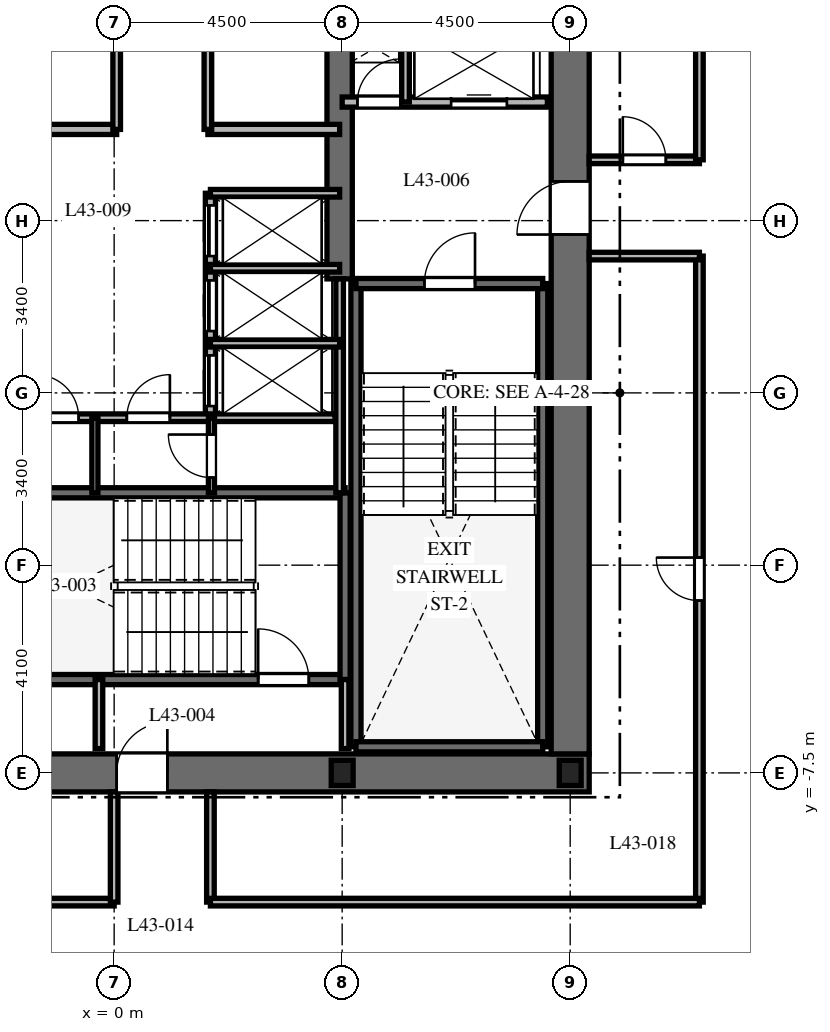
"""IFC4 building model, lengths in metres.
Left out: names, types, materials, properties, quantities, classifications, styles, units other than length and angle.
Written with IfcOpenShell. Run it as: python <this file> out.ifc"""

import sys

from ifc_helpers import new_model, si_unit, direction, frame, frame_2d, origin, origin_2d, place, context, subcontext, project, spatial, rectangle, i_section, extrude, element, fill, save


model = new_model("IFC4")
c1 = context("Model", 3, precision=1e-05, world=origin(), true_north=direction((0.0, 1.0)))
c2 = subcontext(c1, "Body", "Model", "MODEL_VIEW")
j1 = project(units=[si_unit("LENGTHUNIT", "METRE"), si_unit("PLANEANGLEUNIT", "RADIAN")], contexts=[c1])
p1 = place(None, origin())
s1 = spatial("IfcSite", under=j1, at=p1, CompositionType="ELEMENT")
p2 = place(p1, origin())
s2 = spatial("IfcBuilding", under=s1, at=p2, CompositionType="ELEMENT")
p3 = place(p2, frame((0.0, 0.0, 175.6)))
s3 = spatial("IfcBuildingStorey", under=s2, at=p3, CompositionType="ELEMENT", Elevation=175.6)
p4 = place(p3, frame((-9.375, -7.5, 0.0), z_axis=(0.0, 0.0, 1.0), x_axis=(1.0, 0.0, 0.0)))
e1 = element("IfcWall", 1, at=p4, inside=s3, PredefinedType="SHEAR", context=c2, shape_type="SweptSolid", body=[
    extrude(rectangle(XDim=18.75, YDim=0.75, at=frame_2d((9.375, 0.0))), origin(), (0.0, 0.0, 1.0), 3.7),
])
p5 = place(p4, frame((9.425, 0.0, 0.0)))
e2 = element("IfcOpeningElement", 2, at=p5, cuts=e1, PredefinedType="OPENING", context=c2, shape_type="SweptSolid", body=[
    extrude(rectangle(XDim=1.0, YDim=2.15, at=frame_2d((0.5, 1.075))), frame((0.0, 0.385, 0.0), z_axis=(0.0, -1.0, 0.0), x_axis=(1.0, 0.0, 0.0)), (0.0, 0.0, 1.0), 0.77),
])
p6 = place(p3, frame((9.0, -7.125, 0.0), z_axis=(0.0, 0.0, 1.0), x_axis=(0.0, 1.0, 0.0)))
e3 = element("IfcWall", 3, at=p6, inside=s3, PredefinedType="SHEAR", context=c2, shape_type="SweptSolid", body=[
    extrude(rectangle(XDim=14.25, YDim=0.75, at=frame_2d((7.125, 0.0))), origin(), (0.0, 0.0, 1.0), 3.7),
])
p7 = place(p6, frame((10.25, 0.0, 0.0)))
e4 = element("IfcOpeningElement", 4, at=p7, cuts=e3, PredefinedType="OPENING", context=c2, shape_type="SweptSolid", body=[
    extrude(rectangle(XDim=1.05, YDim=2.15, at=frame_2d((0.525, 1.075))), frame((0.0, 0.385, 0.0), z_axis=(0.0, -1.0, 0.0), x_axis=(1.0, 0.0, 0.0)), (0.0, 0.0, 1.0), 0.77),
])
p8 = place(p3, frame((4.45, 2.25, 0.0), z_axis=(0.0, 0.0, 1.0), x_axis=(0.0, 1.0, 0.0)))
e5 = element("IfcWall", 5, at=p8, inside=s3, PredefinedType="SHEAR", context=c2, shape_type="SweptSolid", body=[
    extrude(rectangle(XDim=4.875, YDim=0.5, at=frame_2d((2.438, 0.0))), origin(), (0.0, 0.0, 1.0), 3.7),
])
for number, where, z_axis, x_axis in (
    (6, (4.772, -6.985, 0.0), (0.0, 0.0, 1.0), (0.0, 1.0, 0.0)),
    (7, (8.458, -6.985, 0.0), (0.0, 0.0, 1.0), (0.0, 1.0, 0.0)),
):
    element("IfcWall", number, at=place(p3, frame(where, z_axis=z_axis, x_axis=x_axis)), inside=s3, PredefinedType="SHEAR", context=c2, shape_type="SweptSolid", body=[
        extrude(rectangle(XDim=9.143, YDim=0.2, at=frame_2d((4.572, 0.0))), origin(), (0.0, 0.0, 1.0), 3.7),
    ])
p9 = place(p3, frame((4.772, -6.985, 0.0), z_axis=(0.0, 0.0, 1.0), x_axis=(1.0, 0.0, 0.0)))
e8 = element("IfcWall", 8, at=p9, inside=s3, PredefinedType="SHEAR", context=c2, shape_type="SweptSolid", body=[
    extrude(rectangle(XDim=3.686, YDim=0.2, at=frame_2d((1.843, 0.0))), origin(), (0.0, 0.0, 1.0), 3.7),
])
p10 = place(p3, frame((4.772, 2.158, 0.0), z_axis=(0.0, 0.0, 1.0), x_axis=(1.0, 0.0, 0.0)))
e9 = element("IfcWall", 9, at=p10, inside=s3, PredefinedType="SHEAR", context=c2, shape_type="SweptSolid", body=[
    extrude(rectangle(XDim=3.686, YDim=0.2, at=frame_2d((1.843, 0.0))), origin(), (0.0, 0.0, 1.0), 3.7),
])
p11 = place(p10, frame((1.35, 0.0, 0.0)))
e10 = element("IfcOpeningElement", 10, at=p11, cuts=e9, PredefinedType="OPENING", context=c2, shape_type="SweptSolid", body=[
    extrude(rectangle(XDim=1.0, YDim=2.15, at=frame_2d((0.5, 1.075))), frame((0.0, 0.11, 0.0), z_axis=(0.0, -1.0, 0.0), x_axis=(1.0, 0.0, 0.0)), (0.0, 0.0, 1.0), 0.22),
])
p12 = place(p3, frame((-4.608, -5.658, 0.0), z_axis=(0.0, 0.0, 1.0), x_axis=(1.0, 0.0, 0.0)))
e11 = element("IfcWall", 11, at=p12, inside=s3, PredefinedType="SHEAR", context=c2, shape_type="SweptSolid", body=[
    extrude(rectangle(XDim=9.166, YDim=0.2, at=frame_2d((4.583, 0.0))), origin(), (0.0, 0.0, 1.0), 3.7),
])
p13 = place(p12, frame((7.45, 0.0, 0.0)))
e12 = element("IfcOpeningElement", 12, at=p13, cuts=e11, PredefinedType="OPENING", context=c2, shape_type="SweptSolid", body=[
    extrude(rectangle(XDim=1.0, YDim=2.15, at=frame_2d((0.5, 1.075))), frame((0.0, 0.11, 0.0), z_axis=(0.0, -1.0, 0.0), x_axis=(1.0, 0.0, 0.0)), (0.0, 0.0, 1.0), 0.22),
])
p14 = place(p3, frame((-4.608, -1.972, 0.0), z_axis=(0.0, 0.0, 1.0), x_axis=(1.0, 0.0, 0.0)))
e13 = element("IfcWall", 13, at=p14, inside=s3, PredefinedType="SHEAR", context=c2, shape_type="SweptSolid", body=[
    extrude(rectangle(XDim=9.166, YDim=0.2, at=frame_2d((4.583, 0.0))), origin(), (0.0, 0.0, 1.0), 3.7),
])
p15 = place(p3, frame((4.558, -5.658, 0.0), z_axis=(0.0, 0.0, 1.0), x_axis=(0.0, 1.0, 0.0)))
e14 = element("IfcWall", 14, at=p15, inside=s3, PredefinedType="SHEAR", context=c2, shape_type="SweptSolid", body=[
    extrude(rectangle(XDim=3.686, YDim=0.2, at=frame_2d((1.843, 0.0))), origin(), (0.0, 0.0, 1.0), 3.7),
])
for number, where, z_axis, x_axis in (
    (15, (4.5, -7.5, 0.0), (0.0, 0.0, 1.0), (1.0, 0.0, 0.0)),
    (16, (9.0, -7.5, 0.0), (0.0, 0.0, 1.0), (1.0, 0.0, 0.0)),
):
    element("IfcColumn", number, at=place(p3, frame(where, z_axis=z_axis, x_axis=x_axis)), inside=s3, PredefinedType="COLUMN", context=c2, shape_type="SweptSolid", body=[
        extrude(i_section(OverallWidth=0.432, OverallDepth=0.498, WebThickness=0.056, FlangeThickness=0.089, at=origin_2d()), origin(), (0.0, 0.0, 1.0), 3.7),
    ])
for number, where, z_axis, x_axis in (
    (17, (-0.3, -7.02, 0.0), (0.0, 0.0, 1.0), (0.0, 1.0, 0.0)),
    (18, (4.558, -7.02, 0.0), (0.0, 0.0, 1.0), (0.0, 1.0, 0.0)),
):
    element("IfcWall", number, at=place(p3, frame(where, z_axis=z_axis, x_axis=x_axis)), inside=s3, PredefinedType="PARTITIONING", context=c2, shape_type="SweptSolid", body=[
        extrude(rectangle(XDim=1.362, YDim=0.15, at=frame_2d((0.681, 0.0))), origin(), (0.0, 0.0, 1.0), 3.4),
    ])
p16 = place(p3, frame((4.5, 5.74, 0.0), z_axis=(0.0, 0.0, 1.0), x_axis=(1.0, 0.0, 0.0)))
e19 = element("IfcWall", 19, at=p16, inside=s3, PredefinedType="PARTITIONING", context=c2, shape_type="SweptSolid", body=[
    extrude(rectangle(XDim=4.05, YDim=0.2, at=frame_2d((2.025, 0.0))), origin(), (0.0, 0.0, 1.0), 3.4),
])
p17 = place(p16, frame((0.3, 0.0, 0.0)))
e20 = element("IfcOpeningElement", 20, at=p17, cuts=e19, PredefinedType="OPENING", context=c2, shape_type="SweptSolid", body=[
    extrude(rectangle(XDim=0.85, YDim=2.03, at=frame_2d((0.425, 1.015))), frame((0.0, 0.11, 0.0), z_axis=(0.0, -1.0, 0.0), x_axis=(1.0, 0.0, 0.0)), (0.0, 0.0, 1.0), 0.22),
])
p18 = place(p16, frame((2.15, 0.0, 0.0)))
e21 = element("IfcOpeningElement", 21, at=p18, cuts=e19, PredefinedType="OPENING", context=c2, shape_type="SweptSolid", body=[
    extrude(rectangle(XDim=1.1, YDim=2.2, at=frame_2d((0.55, 1.1))), frame((0.0, 0.11, 0.0), z_axis=(0.0, -1.0, 0.0), x_axis=(1.0, 0.0, 0.0)), (0.0, 0.0, 1.0), 0.22),
])
p19 = place(p3, frame((5.75, 5.74, 0.0), z_axis=(0.0, 0.0, 1.0), x_axis=(0.0, 1.0, 0.0)))
e22 = element("IfcWall", 22, at=p19, inside=s3, PredefinedType="PARTITIONING", context=c2, shape_type="SweptSolid", body=[
    extrude(rectangle(XDim=1.41, YDim=0.15, at=frame_2d((0.705, 0.0))), origin(), (0.0, 0.0, 1.0), 3.4),
])
p20 = place(p3, frame((-4.45, 5.2, 0.0), z_axis=(0.0, 0.0, 1.0), x_axis=(1.0, 0.0, 0.0)))
e23 = element("IfcWall", 23, at=p20, inside=s3, PredefinedType="PARTITIONING", context=c2, shape_type="SweptSolid", body=[
    extrude(rectangle(XDim=4.5, YDim=0.2, at=frame_2d((2.25, 0.0))), origin(), (0.0, 0.0, 1.0), 3.4),
])
p21 = place(p3, frame((1.85, 5.2, 0.0), z_axis=(0.0, 0.0, 1.0), x_axis=(1.0, 0.0, 0.0)))
e24 = element("IfcWall", 24, at=p21, inside=s3, PredefinedType="PARTITIONING", context=c2, shape_type="SweptSolid", body=[
    extrude(rectangle(XDim=2.6, YDim=0.2, at=frame_2d((1.3, 0.0))), origin(), (0.0, 0.0, 1.0), 3.4),
])
for number, where, z_axis, x_axis in (
    (25, (0.05, 5.2, 0.0), (0.0, 0.0, 1.0), (0.0, 1.0, 0.0)),
    (26, (1.85, 5.2, 0.0), (0.0, 0.0, 1.0), (0.0, 1.0, 0.0)),
):
    element("IfcWall", number, at=place(p3, frame(where, z_axis=z_axis, x_axis=x_axis)), inside=s3, PredefinedType="PARTITIONING", context=c2, shape_type="SweptSolid", body=[
        extrude(rectangle(XDim=1.95, YDim=0.15, at=frame_2d((0.975, 0.0))), origin(), (0.0, 0.0, 1.0), 3.4),
    ])
p22 = place(p3, frame((4.45, -1.972, 0.0), z_axis=(0.0, 0.0, 1.0), x_axis=(0.0, 1.0, 0.0)))
e27 = element("IfcWall", 27, at=p22, inside=s3, PredefinedType="PARTITIONING", context=c2, shape_type="SweptSolid", body=[
    extrude(rectangle(XDim=4.222, YDim=0.15, at=frame_2d((2.111, 0.0))), origin(), (0.0, 0.0, 1.0), 3.4),
])
p23 = place(p3, frame((1.9, -0.5, 0.0), z_axis=(0.0, 0.0, 1.0), x_axis=(0.0, 1.0, 0.0)))
e28 = element("IfcWall", 28, at=p23, inside=s3, PredefinedType="PARTITIONING", context=c2, shape_type="SweptSolid", body=[
    extrude(rectangle(XDim=4.44, YDim=0.2, at=frame_2d((2.22, 0.0))), origin(), (0.0, 0.0, 1.0), 3.4),
])
p24 = place(p23, frame((0.24, 0.0, 0.0)))
e29 = element("IfcOpeningElement", 29, at=p24, cuts=e28, PredefinedType="OPENING", context=c2, shape_type="SweptSolid", body=[
    extrude(rectangle(XDim=1.0, YDim=2.2, at=frame_2d((0.5, 1.1))), frame((0.0, 0.11, 0.0), z_axis=(0.0, -1.0, 0.0), x_axis=(1.0, 0.0, 0.0)), (0.0, 0.0, 1.0), 0.22),
])
p25 = place(p23, frame((1.72, 0.0, 0.0)))
e30 = element("IfcOpeningElement", 30, at=p25, cuts=e28, PredefinedType="OPENING", context=c2, shape_type="SweptSolid", body=[
    extrude(rectangle(XDim=1.0, YDim=2.2, at=frame_2d((0.5, 1.1))), frame((0.0, 0.11, 0.0), z_axis=(0.0, -1.0, 0.0), x_axis=(1.0, 0.0, 0.0)), (0.0, 0.0, 1.0), 0.22),
])
p26 = place(p23, frame((3.2, 0.0, 0.0)))
e31 = element("IfcOpeningElement", 31, at=p26, cuts=e28, PredefinedType="OPENING", context=c2, shape_type="SweptSolid", body=[
    extrude(rectangle(XDim=1.0, YDim=2.2, at=frame_2d((0.5, 1.1))), frame((0.0, 0.11, 0.0), z_axis=(0.0, -1.0, 0.0), x_axis=(1.0, 0.0, 0.0)), (0.0, 0.0, 1.0), 0.22),
])
for number, where, z_axis, x_axis in (
    (32, (1.9, 3.94, 0.0), (0.0, 0.0, 1.0), (1.0, 0.0, 0.0)),
    (33, (1.9, 0.98, 0.0), (0.0, 0.0, 1.0), (1.0, 0.0, 0.0)),
    (34, (1.9, 2.46, 0.0), (0.0, 0.0, 1.0), (1.0, 0.0, 0.0)),
):
    element("IfcWall", number, at=place(p3, frame(where, z_axis=z_axis, x_axis=x_axis)), inside=s3, PredefinedType="PARTITIONING", context=c2, shape_type="SweptSolid", body=[
        extrude(rectangle(XDim=2.55, YDim=0.15, at=frame_2d((1.275, 0.0))), origin(), (0.0, 0.0, 1.0), 3.4),
    ])
p27 = place(p3, frame((-4.36, -0.49, 0.0), z_axis=(0.0, 0.0, 1.0), x_axis=(1.0, 0.0, 0.0)))
e35 = element("IfcWall", 35, at=p27, inside=s3, PredefinedType="PARTITIONING", context=c2, shape_type="SweptSolid", body=[
    extrude(rectangle(XDim=8.72, YDim=0.15, at=frame_2d((4.36, 0.0))), origin(), (0.0, 0.0, 1.0), 3.4),
])
p28 = place(p27, frame((2.81, 0.0, 0.0)))
e36 = element("IfcOpeningElement", 36, at=p28, cuts=e35, PredefinedType="OPENING", context=c2, shape_type="SweptSolid", body=[
    extrude(rectangle(XDim=0.85, YDim=2.03, at=frame_2d((0.425, 1.015))), frame((0.0, 0.085, 0.0), z_axis=(0.0, -1.0, 0.0), x_axis=(1.0, 0.0, 0.0)), (0.0, 0.0, 1.0), 0.17),
])
p29 = place(p27, frame((4.61, 0.0, 0.0)))
e37 = element("IfcOpeningElement", 37, at=p29, cuts=e35, PredefinedType="OPENING", context=c2, shape_type="SweptSolid", body=[
    extrude(rectangle(XDim=0.85, YDim=2.03, at=frame_2d((0.425, 1.015))), frame((0.0, 0.085, 0.0), z_axis=(0.0, -1.0, 0.0), x_axis=(1.0, 0.0, 0.0)), (0.0, 0.0, 1.0), 0.17),
])
p30 = place(p3, frame((-0.38, -1.972, 0.0), z_axis=(0.0, 0.0, 1.0), x_axis=(0.0, 1.0, 0.0)))
e38 = element("IfcWall", 38, at=p30, inside=s3, PredefinedType="PARTITIONING", context=c2, shape_type="SweptSolid", body=[
    extrude(rectangle(XDim=1.472, YDim=0.12, at=frame_2d((0.736, 0.0))), origin(), (0.0, 0.0, 1.0), 3.4),
])
p31 = place(p3, frame((1.92, -1.972, 0.0), z_axis=(0.0, 0.0, 1.0), x_axis=(0.0, 1.0, 0.0)))
e39 = element("IfcWall", 39, at=p31, inside=s3, PredefinedType="PARTITIONING", context=c2, shape_type="SweptSolid", body=[
    extrude(rectangle(XDim=1.472, YDim=0.12, at=frame_2d((0.736, 0.0))), origin(), (0.0, 0.0, 1.0), 3.4),
])
p32 = place(p31, frame((0.3, 0.0, 0.0)))
e40 = element("IfcOpeningElement", 40, at=p32, cuts=e39, PredefinedType="OPENING", context=c2, shape_type="SweptSolid", body=[
    extrude(rectangle(XDim=0.85, YDim=2.03, at=frame_2d((0.425, 1.015))), frame((0.0, 0.07, 0.0), z_axis=(0.0, -1.0, 0.0), x_axis=(1.0, 0.0, 0.0)), (0.0, 0.0, 1.0), 0.14),
])
p33 = place(p3, frame((11.55, -10.05, 0.0), z_axis=(0.0, 0.0, 1.0), x_axis=(0.0, 1.0, 0.0)))
e41 = element("IfcWall", 41, at=p33, inside=s3, PredefinedType="PARTITIONING", context=c2, shape_type="SweptSolid", body=[
    extrude(rectangle(XDim=12.75, YDim=0.15, at=frame_2d((6.375, 0.0))), origin(), (0.0, 0.0, 1.0), 2.84),
])
p34 = place(p33, frame((5.95, 0.0, 0.0)))
e42 = element("IfcOpeningElement", 42, at=p34, cuts=e41, PredefinedType="OPENING", context=c2, shape_type="SweptSolid", body=[
    extrude(rectangle(XDim=0.85, YDim=2.03, at=frame_2d((0.425, 1.015))), frame((0.0, 0.085, 0.0), z_axis=(0.0, -1.0, 0.0), x_axis=(1.0, 0.0, 0.0)), (0.0, 0.0, 1.0), 0.17),
])
p35 = place(p3, frame((11.55, 2.7, 0.0), z_axis=(0.0, 0.0, 1.0), x_axis=(-1.0, 0.0, 0.0)))
e43 = element("IfcWall", 43, at=p35, inside=s3, PredefinedType="PARTITIONING", context=c2, shape_type="SweptSolid", body=[
    extrude(rectangle(XDim=2.175, YDim=0.15, at=frame_2d((1.087, 0.0))), origin(), (0.0, 0.0, 1.0), 3.4),
])
p36 = place(p3, frame((9.375, 4.6, 0.0), z_axis=(0.0, 0.0, 1.0), x_axis=(1.0, 0.0, 0.0)))
e44 = element("IfcWall", 44, at=p36, inside=s3, PredefinedType="PARTITIONING", context=c2, shape_type="SweptSolid", body=[
    extrude(rectangle(XDim=2.175, YDim=0.15, at=frame_2d((1.087, 0.0))), origin(), (0.0, 0.0, 1.0), 3.4),
])
p37 = place(p36, frame((0.663, 0.0, 0.0)))
e45 = element("IfcOpeningElement", 45, at=p37, cuts=e44, PredefinedType="OPENING", context=c2, shape_type="SweptSolid", body=[
    extrude(rectangle(XDim=0.85, YDim=2.03, at=frame_2d((0.425, 1.015))), frame((0.0, 0.085, 0.0), z_axis=(0.0, -1.0, 0.0), x_axis=(1.0, 0.0, 0.0)), (0.0, 0.0, 1.0), 0.17),
])
p38 = place(p3, frame((11.55, 4.6, 0.0), z_axis=(0.0, 0.0, 1.0), x_axis=(0.0, 1.0, 0.0)))
e46 = element("IfcWall", 46, at=p38, inside=s3, PredefinedType="PARTITIONING", context=c2, shape_type="SweptSolid", body=[
    extrude(rectangle(XDim=5.45, YDim=0.15, at=frame_2d((2.725, 0.0))), origin(), (0.0, 0.0, 1.0), 2.84),
])
p39 = place(p3, frame((-11.55, -10.05, 0.0), z_axis=(0.0, 0.0, 1.0), x_axis=(1.0, 0.0, 0.0)))
e47 = element("IfcWall", 47, at=p39, inside=s3, PredefinedType="PARTITIONING", context=c2, shape_type="SweptSolid", body=[
    extrude(rectangle(XDim=11.55, YDim=0.15, at=frame_2d((5.775, 0.0))), origin(), (0.0, 0.0, 1.0), 2.84),
])
for number, where, z_axis, x_axis in (
    (48, (0.0, -10.05, 0.0), (0.0, 0.0, 1.0), (0.0, 1.0, 0.0)),
    (49, (1.9, -7.875, 0.0), (0.0, 0.0, 1.0), (0.0, -1.0, 0.0)),
):
    element("IfcWall", number, at=place(p3, frame(where, z_axis=z_axis, x_axis=x_axis)), inside=s3, PredefinedType="PARTITIONING", context=c2, shape_type="SweptSolid", body=[
        extrude(rectangle(XDim=2.175, YDim=0.15, at=frame_2d((1.087, 0.0))), origin(), (0.0, 0.0, 1.0), 3.4),
    ])
p40 = place(p3, frame((1.9, -10.05, 0.0), z_axis=(0.0, 0.0, 1.0), x_axis=(1.0, 0.0, 0.0)))
e50 = element("IfcWall", 50, at=p40, inside=s3, PredefinedType="PARTITIONING", context=c2, shape_type="SweptSolid", body=[
    extrude(rectangle(XDim=9.65, YDim=0.15, at=frame_2d((4.825, 0.0))), origin(), (0.0, 0.0, 1.0), 2.84),
])
p41 = place(p11, origin())
e51 = element("IfcDoor", 51, at=p41, inside=s3, OperationType="SINGLE_SWING_RIGHT", PredefinedType="DOOR", context=c2, shape_type="SweptSolid", body=[
    extrude(rectangle(XDim=1.0, YDim=2.15, at=frame_2d((0.5, 1.075))), frame((0.0, 0.025, 0.0), z_axis=(0.0, -1.0, 0.0), x_axis=(1.0, 0.0, 0.0)), (0.0, 0.0, 1.0), 0.05),
])
fill(e10, e51)
p42 = place(p13, origin())
e52 = element("IfcDoor", 52, at=p42, inside=s3, OperationType="SINGLE_SWING_LEFT", PredefinedType="DOOR", context=c2, shape_type="SweptSolid", body=[
    extrude(rectangle(XDim=1.0, YDim=2.15, at=frame_2d((0.5, 1.075))), frame((0.0, 0.025, 0.0), z_axis=(0.0, -1.0, 0.0), x_axis=(1.0, 0.0, 0.0)), (0.0, 0.0, 1.0), 0.05),
])
fill(e12, e52)
p43 = place(p5, origin())
e53 = element("IfcDoor", 53, at=p43, inside=s3, OperationType="SINGLE_SWING_RIGHT", PredefinedType="DOOR", context=c2, shape_type="SweptSolid", body=[
    extrude(rectangle(XDim=1.0, YDim=2.15, at=frame_2d((0.5, 1.075))), frame((0.0, 0.025, 0.0), z_axis=(0.0, -1.0, 0.0), x_axis=(1.0, 0.0, 0.0)), (0.0, 0.0, 1.0), 0.05),
])
fill(e2, e53)
p44 = place(p7, origin())
e54 = element("IfcDoor", 54, at=p44, inside=s3, OperationType="SINGLE_SWING_LEFT", PredefinedType="DOOR", context=c2, shape_type="SweptSolid", body=[
    extrude(rectangle(XDim=1.05, YDim=2.15, at=frame_2d((0.525, 1.075))), frame((0.0, 0.025, 0.0), z_axis=(0.0, -1.0, 0.0), x_axis=(1.0, 0.0, 0.0)), (0.0, 0.0, 1.0), 0.05),
])
fill(e4, e54)
p45 = place(p17, origin())
e55 = element("IfcDoor", 55, at=p45, inside=s3, OperationType="SINGLE_SWING_RIGHT", PredefinedType="DOOR", context=c2, shape_type="SweptSolid", body=[
    extrude(rectangle(XDim=0.85, YDim=2.03, at=frame_2d((0.425, 1.015))), frame((0.0, 0.025, 0.0), z_axis=(0.0, -1.0, 0.0), x_axis=(1.0, 0.0, 0.0)), (0.0, 0.0, 1.0), 0.05),
])
fill(e20, e55)
p46 = place(p18, origin())
e56 = element("IfcDoor", 56, at=p46, inside=s3, OperationType="SLIDING_TO_RIGHT", PredefinedType="DOOR", context=c2, shape_type="SweptSolid", body=[
    extrude(rectangle(XDim=1.1, YDim=2.2, at=frame_2d((0.55, 1.1))), frame((0.0, 0.025, 0.0), z_axis=(0.0, -1.0, 0.0), x_axis=(1.0, 0.0, 0.0)), (0.0, 0.0, 1.0), 0.05),
])
fill(e21, e56)
p47 = place(p24, origin())
e57 = element("IfcDoor", 57, at=p47, inside=s3, OperationType="SLIDING_TO_RIGHT", PredefinedType="DOOR", context=c2, shape_type="SweptSolid", body=[
    extrude(rectangle(XDim=1.0, YDim=2.2, at=frame_2d((0.5, 1.1))), frame((0.0, 0.025, 0.0), z_axis=(0.0, -1.0, 0.0), x_axis=(1.0, 0.0, 0.0)), (0.0, 0.0, 1.0), 0.05),
])
fill(e29, e57)
p48 = place(p25, origin())
e58 = element("IfcDoor", 58, at=p48, inside=s3, OperationType="SLIDING_TO_RIGHT", PredefinedType="DOOR", context=c2, shape_type="SweptSolid", body=[
    extrude(rectangle(XDim=1.0, YDim=2.2, at=frame_2d((0.5, 1.1))), frame((0.0, 0.025, 0.0), z_axis=(0.0, -1.0, 0.0), x_axis=(1.0, 0.0, 0.0)), (0.0, 0.0, 1.0), 0.05),
])
fill(e30, e58)
p49 = place(p26, origin())
e59 = element("IfcDoor", 59, at=p49, inside=s3, OperationType="SLIDING_TO_RIGHT", PredefinedType="DOOR", context=c2, shape_type="SweptSolid", body=[
    extrude(rectangle(XDim=1.0, YDim=2.2, at=frame_2d((0.5, 1.1))), frame((0.0, 0.025, 0.0), z_axis=(0.0, -1.0, 0.0), x_axis=(1.0, 0.0, 0.0)), (0.0, 0.0, 1.0), 0.05),
])
fill(e31, e59)
p50 = place(p28, origin())
e60 = element("IfcDoor", 60, at=p50, inside=s3, OperationType="SINGLE_SWING_LEFT", PredefinedType="DOOR", context=c2, shape_type="SweptSolid", body=[
    extrude(rectangle(XDim=0.85, YDim=2.03, at=frame_2d((0.425, 1.015))), frame((0.0, 0.025, 0.0), z_axis=(0.0, -1.0, 0.0), x_axis=(1.0, 0.0, 0.0)), (0.0, 0.0, 1.0), 0.05),
])
fill(e36, e60)
p51 = place(p29, origin())
e61 = element("IfcDoor", 61, at=p51, inside=s3, OperationType="SINGLE_SWING_RIGHT", PredefinedType="DOOR", context=c2, shape_type="SweptSolid", body=[
    extrude(rectangle(XDim=0.85, YDim=2.03, at=frame_2d((0.425, 1.015))), frame((0.0, 0.025, 0.0), z_axis=(0.0, -1.0, 0.0), x_axis=(1.0, 0.0, 0.0)), (0.0, 0.0, 1.0), 0.05),
])
fill(e37, e61)
p52 = place(p32, origin())
e62 = element("IfcDoor", 62, at=p52, inside=s3, OperationType="SINGLE_SWING_RIGHT", PredefinedType="DOOR", context=c2, shape_type="SweptSolid", body=[
    extrude(rectangle(XDim=0.85, YDim=2.03, at=frame_2d((0.425, 1.015))), frame((0.0, 0.025, 0.0), z_axis=(0.0, -1.0, 0.0), x_axis=(1.0, 0.0, 0.0)), (0.0, 0.0, 1.0), 0.05),
])
fill(e40, e62)
p53 = place(p37, origin())
e63 = element("IfcDoor", 63, at=p53, inside=s3, OperationType="SINGLE_SWING_LEFT", PredefinedType="DOOR", context=c2, shape_type="SweptSolid", body=[
    extrude(rectangle(XDim=0.85, YDim=2.03, at=frame_2d((0.425, 1.015))), frame((0.0, 0.025, 0.0), z_axis=(0.0, -1.0, 0.0), x_axis=(1.0, 0.0, 0.0)), (0.0, 0.0, 1.0), 0.05),
])
fill(e45, e63)
p54 = place(p34, origin())
e64 = element("IfcDoor", 64, at=p54, inside=s3, OperationType="SINGLE_SWING_RIGHT", PredefinedType="DOOR", context=c2, shape_type="SweptSolid", body=[
    extrude(rectangle(XDim=0.85, YDim=2.03, at=frame_2d((0.425, 1.015))), frame((0.0, 0.025, 0.0), z_axis=(0.0, -1.0, 0.0), x_axis=(1.0, 0.0, 0.0)), (0.0, 0.0, 1.0), 0.05),
])
fill(e42, e64)
save(model, sys.argv[1])
